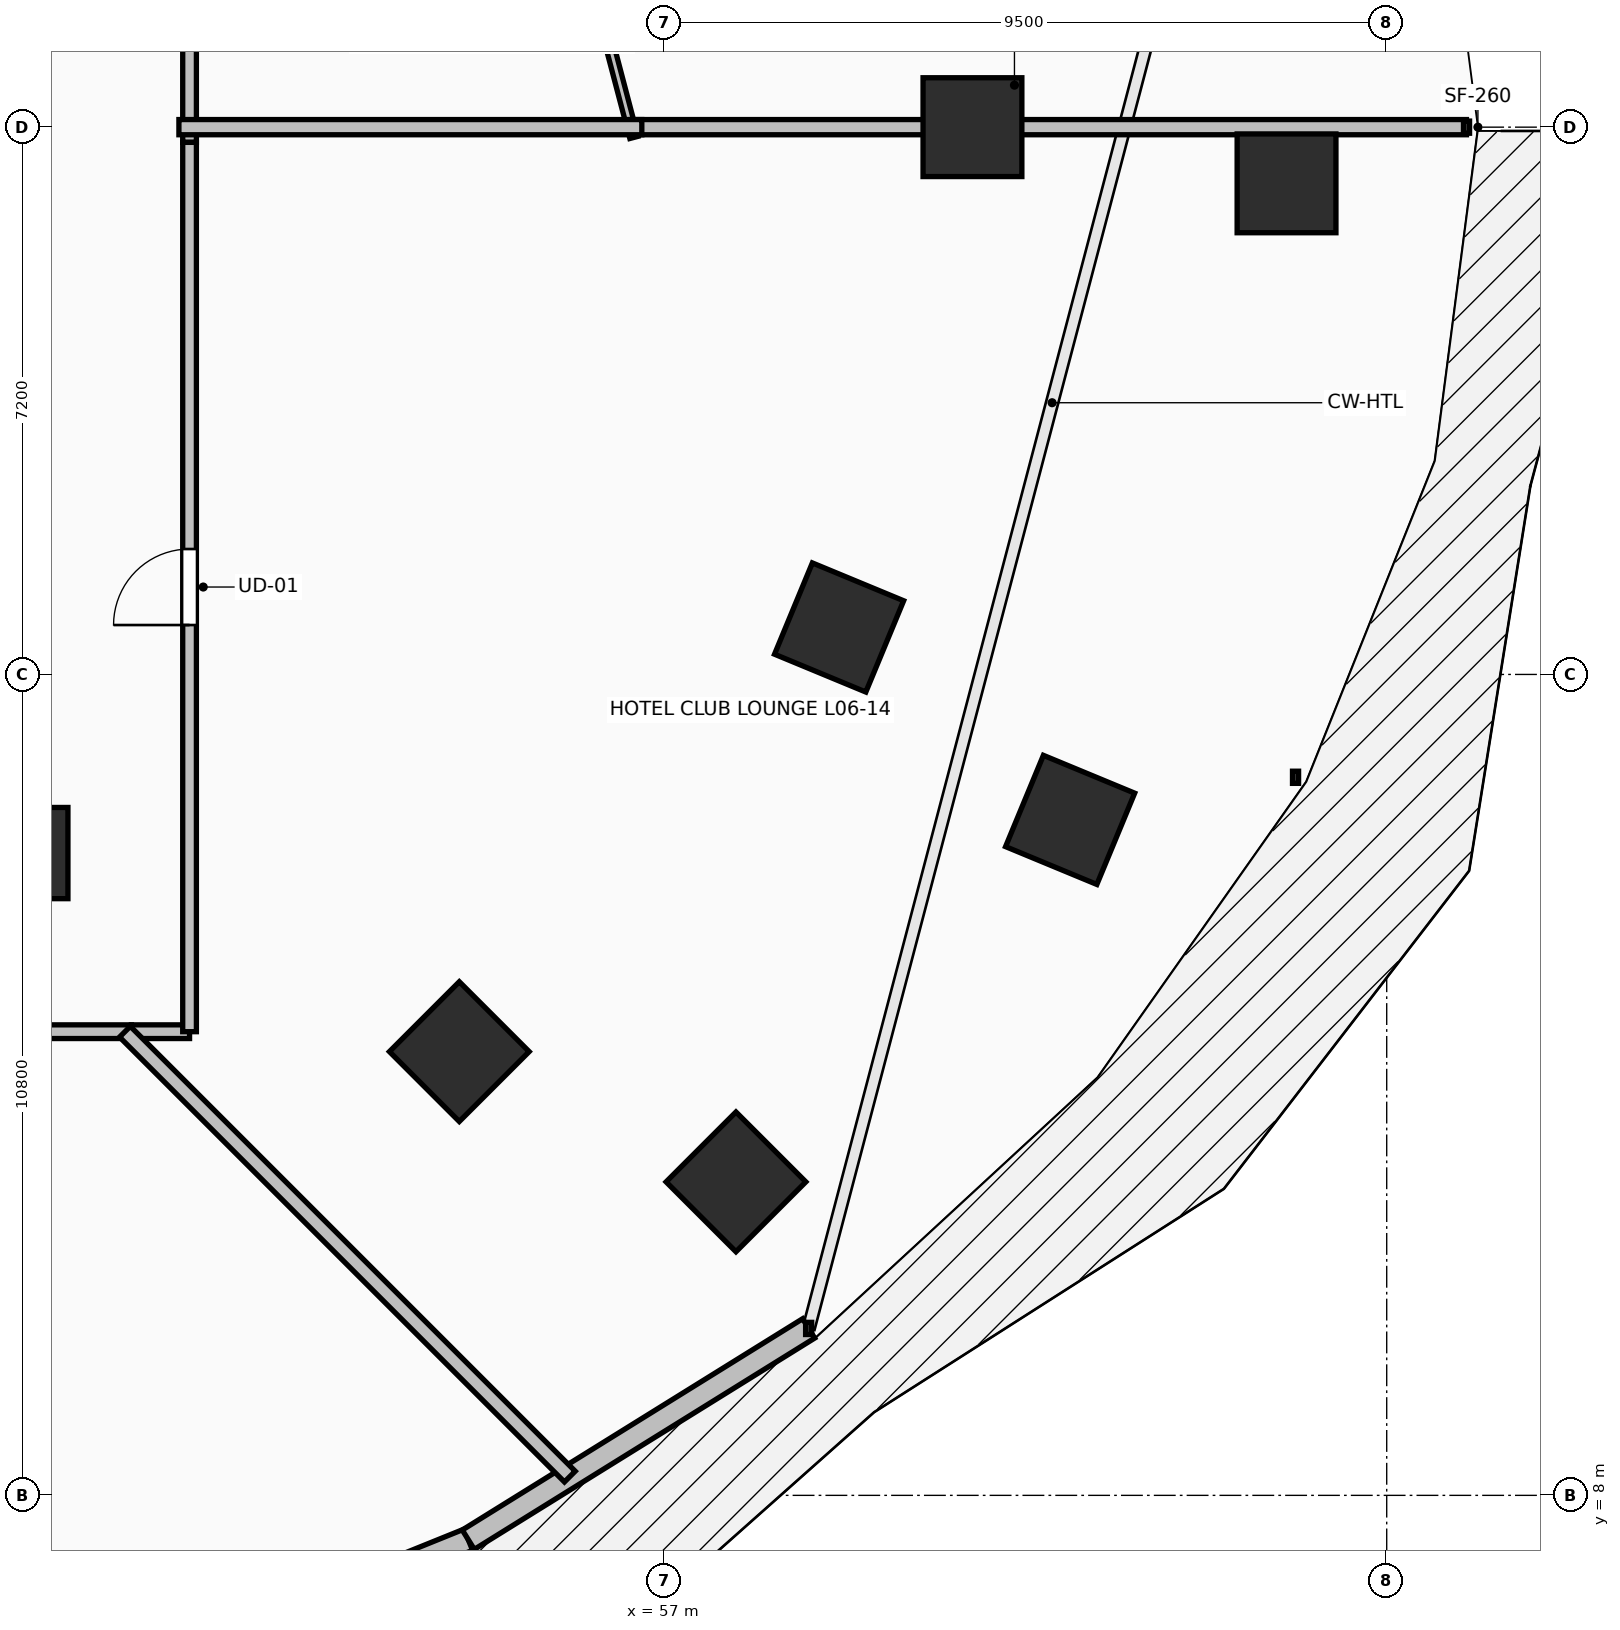
"""IFC4 building model, lengths in metres.
Left out: names, types, materials, properties, quantities, classifications, styles, units other than length and angle.
Written with IfcOpenShell. Run it as: python <this file> out.ifc"""

import sys

from ifc_helpers import new_model, si_unit, direction, frame, frame_2d, origin, origin_2d, place, context, subcontext, project, spatial, rectangle, extrude, element, fill, save


model = new_model("IFC4")
c1 = context("Model", 3, precision=1e-05, world=origin(), true_north=direction((0.0, 1.0)))
c2 = subcontext(c1, "Body", "Model", "MODEL_VIEW")
j1 = project(units=[si_unit("LENGTHUNIT", "METRE"), si_unit("PLANEANGLEUNIT", "RADIAN")], contexts=[c1])
p1 = place(None, origin())
s1 = spatial("IfcSite", under=j1, at=p1, CompositionType="ELEMENT")
p2 = place(p1, origin())
s2 = spatial("IfcBuilding", under=s1, at=p2, CompositionType="ELEMENT")
p3 = place(p2, frame((0.0, 0.0, 27.5)))
s3 = spatial("IfcBuildingStorey", under=s2, at=p3, CompositionType="ELEMENT", Elevation=27.5)
for number, where, z_axis, x_axis in (
    (1, (61.05, 26.0, 0.0), (0.0, 0.0, 1.0), (1.0, 0.0, 0.0)),
    (2, (54.299, 13.838, 0.0), (0.0, 0.0, 1.0), (0.707, -0.707, 0.0)),
    (3, (59.295, 19.418, 0.0), (0.0, 0.0, 1.0), (0.924, -0.383, 0.0)),
    (4, (65.182, 25.261, 0.0), (0.0, 0.0, 1.0), (1.0, 0.0, 0.0)),
    (5, (57.939, 12.124, 0.0), (0.0, 0.0, 1.0), (0.707, -0.707, 0.0)),
    (6, (62.335, 16.886, 0.0), (0.0, 0.0, 1.0), (0.924, -0.383, 0.0)),
):
    element("IfcColumn", number, at=place(p3, frame(where, z_axis=z_axis, x_axis=x_axis)), inside=s3, PredefinedType="COLUMN", context=c2, shape_type="SweptSolid", body=[
        extrude(rectangle(XDim=1.3, YDim=1.3, at=origin_2d()), origin(), (0.0, 0.0, 1.0), 3.5),
    ])
p4 = place(p3, frame((48.75, 16.45, 0.0), z_axis=(0.0, 0.0, 1.0), x_axis=(1.0, 0.0, 0.0)))
e7 = element("IfcColumn", 7, at=p4, inside=s3, PredefinedType="PILASTER", context=c2, shape_type="SweptSolid", body=[
    extrude(rectangle(XDim=0.8, YDim=1.2, at=origin_2d()), origin(), (0.0, 0.0, 1.0), 3.5),
])
p5 = place(p3, frame((49.308, 5.351, 0.0), z_axis=(0.0, 0.0, 1.0), x_axis=(0.927095325176, 0.374825636845, 0.0)))
e8 = element("IfcWall", 8, at=p5, inside=s3, PredefinedType="STANDARD", context=c2, shape_type="SweptSolid", body=[
    extrude(rectangle(XDim=5.51, YDim=0.3, at=frame_2d((2.755, 0.0))), origin(), (0.0, 0.0, 1.0), 3.24),
])
p6 = place(p5, frame((1.955, 0.0, 0.0)))
e9 = element("IfcOpeningElement", 9, at=p6, cuts=e8, PredefinedType="OPENING", context=c2, shape_type="SweptSolid", body=[
    extrude(rectangle(XDim=1.6, YDim=2.3, at=frame_2d((0.8, 1.15))), frame((0.0, 0.165, 0.0), z_axis=(0.0, -1.0, 0.0), x_axis=(1.0, 0.0, 0.0)), (0.0, 0.0, 1.0), 0.33),
])
p7 = place(p3, frame((54.417, 7.417, 0.0), z_axis=(0.0, 0.0, 1.0), x_axis=(0.849633724826, 0.527373239404, 0.0)))
e10 = element("IfcWall", 10, at=p7, inside=s3, PredefinedType="STANDARD", context=c2, shape_type="SweptSolid", body=[
    extrude(rectangle(XDim=5.271, YDim=0.3, at=frame_2d((2.635, 0.0))), origin(), (0.0, 0.0, 1.0), 3.24),
])
p8 = place(p3, frame((50.75, 25.8, 0.0), z_axis=(0.0, 0.0, 1.0), x_axis=(0.0, 1.0, 0.0)))
e11 = element("IfcWall", 11, at=p8, inside=s3, PredefinedType="PARTITIONING", context=c2, shape_type="SweptSolid", body=[
    extrude(rectangle(XDim=2.505, YDim=0.18, at=frame_2d((1.252, 0.0))), origin(), (0.0, 0.0, 1.0), 2.432),
])
p9 = place(p3, frame((42.34, 14.1, 0.0), z_axis=(0.0, 0.0, 1.0), x_axis=(1.0, 0.0, 0.0)))
e12 = element("IfcWall", 12, at=p9, inside=s3, PredefinedType="PARTITIONING", context=c2, shape_type="SweptSolid", body=[
    extrude(rectangle(XDim=7.645, YDim=0.18, at=frame_2d((3.823, 0.0))), origin(), (0.0, 0.0, 1.0), 2.432),
])
p10 = place(p9, frame((3.298, 0.0, 0.0)))
e13 = element("IfcOpeningElement", 13, at=p10, cuts=e12, PredefinedType="OPENING", context=c2, shape_type="SweptSolid", body=[
    extrude(rectangle(XDim=1.05, YDim=2.2, at=frame_2d((0.525, 1.1))), frame((0.0, 0.105, 0.0), z_axis=(0.0, -1.0, 0.0), x_axis=(1.0, 0.0, 0.0)), (0.0, 0.0, 1.0), 0.21),
])
p11 = place(p3, frame((49.985, 14.1, 0.0), z_axis=(0.0, 0.0, 1.0), x_axis=(1.0, 0.0, 0.0)))
e14 = element("IfcWall", 14, at=p11, inside=s3, PredefinedType="PARTITIONING", context=c2, shape_type="SweptSolid", body=[
    extrude(rectangle(XDim=0.765, YDim=0.18, at=frame_2d((0.382, 0.0))), origin(), (0.0, 0.0, 1.0), 3.24),
])
p12 = place(p3, frame((50.75, 14.1, 0.0), z_axis=(0.0, 0.0, 1.0), x_axis=(0.0, 1.0, 0.0)))
e15 = element("IfcWall", 15, at=p12, inside=s3, PredefinedType="PARTITIONING", context=c2, shape_type="SweptSolid", body=[
    extrude(rectangle(XDim=11.7, YDim=0.18, at=frame_2d((5.85, 0.0))), origin(), (0.0, 0.0, 1.0), 2.432),
])
p13 = place(p12, frame((5.35, 0.0, 0.0)))
e16 = element("IfcOpeningElement", 16, at=p13, cuts=e15, PredefinedType="OPENING", context=c2, shape_type="SweptSolid", body=[
    extrude(rectangle(XDim=1.0, YDim=2.15, at=frame_2d((0.5, 1.075))), frame((0.0, 0.105, 0.0), z_axis=(0.0, -1.0, 0.0), x_axis=(1.0, 0.0, 0.0)), (0.0, 0.0, 1.0), 0.21),
])
p14 = place(p3, frame((55.709, 29.232, 0.0), z_axis=(0.0, 0.0, 1.0), x_axis=(0.254476045764, -0.967079077497, 0.0)))
e17 = element("IfcWall", 17, at=p14, inside=s3, PredefinedType="PARTITIONING", context=c2, shape_type="SweptSolid", body=[
    extrude(rectangle(XDim=3.483, YDim=0.11, at=frame_2d((1.741, 0.0))), origin(), (0.0, 0.0, 1.0), 2.432),
])
p15 = place(p3, frame((56.56, 26.0, 0.0), z_axis=(0.0, 0.0, 1.0), x_axis=(1.0, 0.0, 0.0)))
e18 = element("IfcWall", 18, at=p15, inside=s3, PredefinedType="PARTITIONING", context=c2, shape_type="SweptSolid", body=[
    extrude(rectangle(XDim=10.989, YDim=0.2, at=frame_2d((5.495, 0.0))), origin(), (0.0, 0.0, 1.0), 2.432),
])
p16 = place(p3, frame((50.61, 26.0, 0.0), z_axis=(0.0, 0.0, 1.0), x_axis=(1.0, 0.0, 0.0)))
e19 = element("IfcWall", 19, at=p16, inside=s3, PredefinedType="PARTITIONING", context=c2, shape_type="SweptSolid", body=[
    extrude(rectangle(XDim=6.09, YDim=0.2, at=frame_2d((3.045, 0.0))), origin(), (0.0, 0.0, 1.0), 2.432),
])
p17 = place(p3, frame((55.753, 8.247, 0.0), z_axis=(0.0, 0.0, 1.0), x_axis=(-0.707106781187, 0.707106781187, 0.0)))
e20 = element("IfcWall", 20, at=p17, inside=s3, PredefinedType="PARTITIONING", context=c2, shape_type="SweptSolid", body=[
    extrude(rectangle(XDim=8.277, YDim=0.2, at=frame_2d((4.139, 0.0))), origin(), (0.0, 0.0, 1.0), 2.624),
])
p18 = place(p13, origin())
e21 = element("IfcDoor", 21, at=p18, inside=s3, OperationType="SINGLE_SWING_LEFT", PredefinedType="DOOR", context=c2, shape_type="SweptSolid", body=[
    extrude(rectangle(XDim=1.0, YDim=2.15, at=frame_2d((0.5, 1.075))), frame((0.0, 0.025, 0.0), z_axis=(0.0, -1.0, 0.0), x_axis=(1.0, 0.0, 0.0)), (0.0, 0.0, 1.0), 0.05),
])
fill(e16, e21)
save(model, sys.argv[1])
